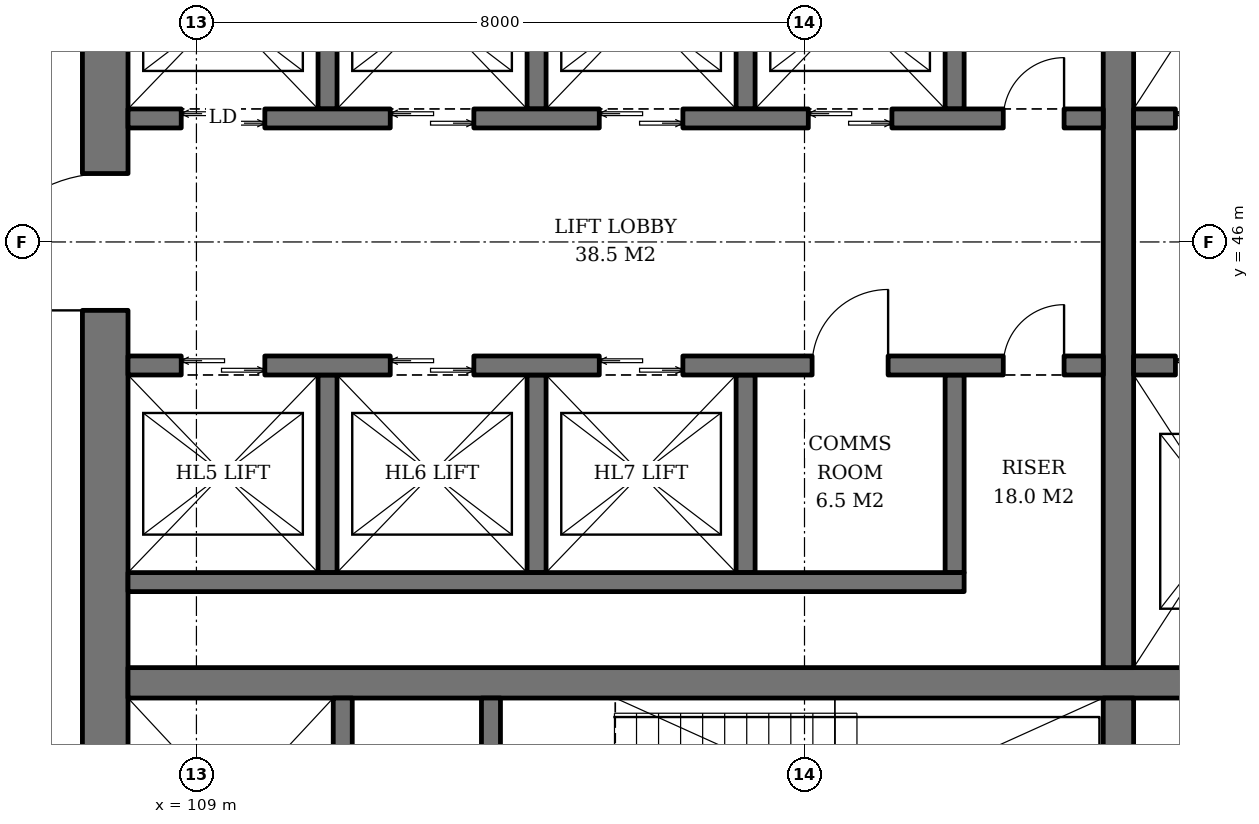
"""IFC4 building model, lengths in metres.
Left out: names, types, materials, properties, quantities, classifications, styles, units other than length and angle.
Written with IfcOpenShell. Run it as: python <this file> out.ifc"""

import sys

from ifc_helpers import new_model, si_unit, direction, frame, frame_2d, origin, place, context, subcontext, project, spatial, rectangle, extrude, element, fill, save


model = new_model("IFC4")
c1 = context("Model", 3, precision=1e-05, world=origin(), true_north=direction((0.0, 1.0)))
c2 = subcontext(c1, "Body", "Model", "MODEL_VIEW")
j1 = project(units=[si_unit("LENGTHUNIT", "METRE"), si_unit("PLANEANGLEUNIT", "RADIAN")], contexts=[c1])
p1 = place(None, origin())
s1 = spatial("IfcSite", under=j1, at=p1, CompositionType="ELEMENT")
p2 = place(p1, origin())
s2 = spatial("IfcBuilding", under=s1, at=p2, CompositionType="ELEMENT")
p3 = place(p2, frame((0.0, 0.0, 66.6)))
s3 = spatial("IfcBuildingStorey", under=s2, at=p3, CompositionType="ELEMENT", Elevation=66.6)
p4 = place(p3, frame((107.8, 37.1, 0.0), z_axis=(0.0, 0.0, 1.0), x_axis=(0.0, 1.0, 0.0)))
e1 = element("IfcWall", 1, at=p4, inside=s3, PredefinedType="SHEAR", context=c2, shape_type="SweptSolid", body=[
    extrude(rectangle(XDim=17.8, YDim=0.6, at=frame_2d((8.9, 0.0))), origin(), (0.0, 0.0, 1.0), 3.8),
])
p5 = place(p4, frame((8.0, 0.0, 0.0)))
e2 = element("IfcOpeningElement", 2, at=p5, cuts=e1, PredefinedType="OPENING", context=c2, shape_type="SweptSolid", body=[
    extrude(rectangle(XDim=1.8, YDim=2.4, at=frame_2d((0.9, 1.2))), frame((0.0, 0.31, 0.0), z_axis=(0.0, -1.0, 0.0), x_axis=(1.0, 0.0, 0.0)), (0.0, 0.0, 1.0), 0.62),
])
p6 = place(p3, frame((108.1, 40.2, 0.0), z_axis=(0.0, 0.0, 1.0), x_axis=(1.0, 0.0, 0.0)))
e3 = element("IfcWall", 3, at=p6, inside=s3, PredefinedType="SHEAR", context=c2, shape_type="SweptSolid", body=[
    extrude(rectangle(XDim=17.8, YDim=0.4, at=frame_2d((8.9, 0.0))), origin(), (0.0, 0.0, 1.0), 3.8),
])
p7 = place(p3, frame((121.13, 37.1, 0.0), z_axis=(0.0, 0.0, 1.0), x_axis=(0.0, 1.0, 0.0)))
e4 = element("IfcWall", 4, at=p7, inside=s3, PredefinedType="SHEAR", context=c2, shape_type="SweptSolid", body=[
    extrude(rectangle(XDim=2.9, YDim=0.4, at=frame_2d((1.45, 0.0))), origin(), (0.0, 0.0, 1.0), 3.8),
])
p8 = place(p3, frame((121.13, 40.4, 0.0), z_axis=(0.0, 0.0, 1.0), x_axis=(0.0, 1.0, 0.0)))
e5 = element("IfcWall", 5, at=p8, inside=s3, PredefinedType="SHEAR", context=c2, shape_type="SweptSolid", body=[
    extrude(rectangle(XDim=11.2, YDim=0.4, at=frame_2d((5.6, 0.0))), origin(), (0.0, 0.0, 1.0), 3.8),
])
p9 = place(p3, frame((110.925, 37.1, 0.0), z_axis=(0.0, 0.0, 1.0), x_axis=(0.0, 1.0, 0.0)))
e6 = element("IfcWall", 6, at=p9, inside=s3, PredefinedType="SHEAR", context=c2, shape_type="SweptSolid", body=[
    extrude(rectangle(XDim=2.9, YDim=0.25, at=frame_2d((1.45, 0.0))), origin(), (0.0, 0.0, 1.0), 3.8),
])
p10 = place(p9, frame((0.8, 0.0, 0.0)))
e7 = element("IfcOpeningElement", 7, at=p10, cuts=e6, PredefinedType="OPENING", context=c2, shape_type="SweptSolid", body=[
    extrude(rectangle(XDim=1.3, YDim=2.2, at=frame_2d((0.65, 1.1))), frame((0.0, 0.135, 0.0), z_axis=(0.0, -1.0, 0.0), x_axis=(1.0, 0.0, 0.0)), (0.0, 0.0, 1.0), 0.27),
])
p11 = place(p3, frame((112.875, 37.1, 0.0), z_axis=(0.0, 0.0, 1.0), x_axis=(0.0, 1.0, 0.0)))
e8 = element("IfcWall", 8, at=p11, inside=s3, PredefinedType="SHEAR", context=c2, shape_type="SweptSolid", body=[
    extrude(rectangle(XDim=2.9, YDim=0.25, at=frame_2d((1.45, 0.0))), origin(), (0.0, 0.0, 1.0), 3.8),
])
p12 = place(p11, frame((0.75, 0.0, 0.0)))
e9 = element("IfcOpeningElement", 9, at=p12, cuts=e8, PredefinedType="OPENING", context=c2, shape_type="SweptSolid", body=[
    extrude(rectangle(XDim=1.2, YDim=2.1, at=frame_2d((0.6, 1.05))), frame((0.0, 0.135, 0.0), z_axis=(0.0, -1.0, 0.0), x_axis=(1.0, 0.0, 0.0)), (0.0, 0.0, 1.0), 0.27),
])
for number, where, z_axis, x_axis in (
    (10, (110.725, 47.75, 0.0), (0.0, 0.0, 1.0), (0.0, 1.0, 0.0)),
    (11, (113.475, 47.75, 0.0), (0.0, 0.0, 1.0), (0.0, 1.0, 0.0)),
    (12, (116.225, 47.75, 0.0), (0.0, 0.0, 1.0), (0.0, 1.0, 0.0)),
    (13, (118.975, 47.75, 0.0), (0.0, 0.0, 1.0), (0.0, 1.0, 0.0)),
):
    element("IfcWall", number, at=place(p3, frame(where, z_axis=z_axis, x_axis=x_axis)), inside=s3, PredefinedType="SHEAR", context=c2, shape_type="SweptSolid", body=[
        extrude(rectangle(XDim=2.6, YDim=0.25, at=frame_2d((1.3, 0.0))), origin(), (0.0, 0.0, 1.0), 3.8),
    ])
p13 = place(p3, frame((108.1, 47.625, 0.0), z_axis=(0.0, 0.0, 1.0), x_axis=(1.0, 0.0, 0.0)))
e14 = element("IfcWall", 14, at=p13, inside=s3, PredefinedType="SHEAR", context=c2, shape_type="SweptSolid", body=[
    extrude(rectangle(XDim=12.83, YDim=0.25, at=frame_2d((6.415, 0.0))), origin(), (0.0, 0.0, 1.0), 3.8),
])
p14 = place(p13, frame((0.7, 0.0, 0.0)))
e15 = element("IfcOpeningElement", 15, at=p14, cuts=e14, PredefinedType="OPENING", context=c2, shape_type="SweptSolid", body=[
    extrude(rectangle(XDim=1.1, YDim=2.2, at=frame_2d((0.55, 1.1))), frame((0.0, 0.135, 0.0), z_axis=(0.0, -1.0, 0.0), x_axis=(1.0, 0.0, 0.0)), (0.0, 0.0, 1.0), 0.27),
])
p15 = place(p13, frame((3.45, 0.0, 0.0)))
e16 = element("IfcOpeningElement", 16, at=p15, cuts=e14, PredefinedType="OPENING", context=c2, shape_type="SweptSolid", body=[
    extrude(rectangle(XDim=1.1, YDim=2.2, at=frame_2d((0.55, 1.1))), frame((0.0, 0.135, 0.0), z_axis=(0.0, -1.0, 0.0), x_axis=(1.0, 0.0, 0.0)), (0.0, 0.0, 1.0), 0.27),
])
p16 = place(p13, frame((6.2, 0.0, 0.0)))
e17 = element("IfcOpeningElement", 17, at=p16, cuts=e14, PredefinedType="OPENING", context=c2, shape_type="SweptSolid", body=[
    extrude(rectangle(XDim=1.1, YDim=2.2, at=frame_2d((0.55, 1.1))), frame((0.0, 0.135, 0.0), z_axis=(0.0, -1.0, 0.0), x_axis=(1.0, 0.0, 0.0)), (0.0, 0.0, 1.0), 0.27),
])
p17 = place(p13, frame((8.95, 0.0, 0.0)))
e18 = element("IfcOpeningElement", 18, at=p17, cuts=e14, PredefinedType="OPENING", context=c2, shape_type="SweptSolid", body=[
    extrude(rectangle(XDim=1.1, YDim=2.2, at=frame_2d((0.55, 1.1))), frame((0.0, 0.135, 0.0), z_axis=(0.0, -1.0, 0.0), x_axis=(1.0, 0.0, 0.0)), (0.0, 0.0, 1.0), 0.27),
])
p18 = place(p13, frame((11.515, 0.0, 0.0)))
e19 = element("IfcOpeningElement", 19, at=p18, cuts=e14, PredefinedType="OPENING", context=c2, shape_type="SweptSolid", body=[
    extrude(rectangle(XDim=0.8, YDim=2.0, at=frame_2d((0.4, 1.0))), frame((0.0, 0.135, 0.0), z_axis=(0.0, -1.0, 0.0), x_axis=(1.0, 0.0, 0.0)), (0.0, 0.0, 1.0), 0.27),
])
for number, where, z_axis, x_axis in (
    (20, (110.725, 44.25, 0.0), (0.0, 0.0, 1.0), (0.0, -1.0, 0.0)),
    (21, (113.475, 44.25, 0.0), (0.0, 0.0, 1.0), (0.0, -1.0, 0.0)),
    (22, (116.225, 44.25, 0.0), (0.0, 0.0, 1.0), (0.0, -1.0, 0.0)),
    (23, (118.975, 44.25, 0.0), (0.0, 0.0, 1.0), (0.0, -1.0, 0.0)),
):
    element("IfcWall", number, at=place(p3, frame(where, z_axis=z_axis, x_axis=x_axis)), inside=s3, PredefinedType="SHEAR", context=c2, shape_type="SweptSolid", body=[
        extrude(rectangle(XDim=2.6, YDim=0.25, at=frame_2d((1.3, 0.0))), origin(), (0.0, 0.0, 1.0), 3.8),
    ])
p19 = place(p3, frame((108.1, 41.525, 0.0), z_axis=(0.0, 0.0, 1.0), x_axis=(1.0, 0.0, 0.0)))
e24 = element("IfcWall", 24, at=p19, inside=s3, PredefinedType="SHEAR", context=c2, shape_type="SweptSolid", body=[
    extrude(rectangle(XDim=11.0, YDim=0.25, at=frame_2d((5.5, 0.0))), origin(), (0.0, 0.0, 1.0), 3.8),
])
p20 = place(p3, frame((108.1, 44.375, 0.0), z_axis=(0.0, 0.0, 1.0), x_axis=(1.0, 0.0, 0.0)))
e25 = element("IfcWall", 25, at=p20, inside=s3, PredefinedType="SHEAR", context=c2, shape_type="SweptSolid", body=[
    extrude(rectangle(XDim=12.83, YDim=0.25, at=frame_2d((6.415, 0.0))), origin(), (0.0, 0.0, 1.0), 3.8),
])
p21 = place(p20, frame((0.7, 0.0, 0.0)))
e26 = element("IfcOpeningElement", 26, at=p21, cuts=e25, PredefinedType="OPENING", context=c2, shape_type="SweptSolid", body=[
    extrude(rectangle(XDim=1.1, YDim=2.2, at=frame_2d((0.55, 1.1))), frame((0.0, 0.135, 0.0), z_axis=(0.0, -1.0, 0.0), x_axis=(1.0, 0.0, 0.0)), (0.0, 0.0, 1.0), 0.27),
])
p22 = place(p20, frame((3.45, 0.0, 0.0)))
e27 = element("IfcOpeningElement", 27, at=p22, cuts=e25, PredefinedType="OPENING", context=c2, shape_type="SweptSolid", body=[
    extrude(rectangle(XDim=1.1, YDim=2.2, at=frame_2d((0.55, 1.1))), frame((0.0, 0.135, 0.0), z_axis=(0.0, -1.0, 0.0), x_axis=(1.0, 0.0, 0.0)), (0.0, 0.0, 1.0), 0.27),
])
p23 = place(p20, frame((6.2, 0.0, 0.0)))
e28 = element("IfcOpeningElement", 28, at=p23, cuts=e25, PredefinedType="OPENING", context=c2, shape_type="SweptSolid", body=[
    extrude(rectangle(XDim=1.1, YDim=2.2, at=frame_2d((0.55, 1.1))), frame((0.0, 0.135, 0.0), z_axis=(0.0, -1.0, 0.0), x_axis=(1.0, 0.0, 0.0)), (0.0, 0.0, 1.0), 0.27),
])
p24 = place(p20, frame((9.0, 0.0, 0.0)))
e29 = element("IfcOpeningElement", 29, at=p24, cuts=e25, PredefinedType="OPENING", context=c2, shape_type="SweptSolid", body=[
    extrude(rectangle(XDim=1.0, YDim=2.1, at=frame_2d((0.5, 1.05))), frame((0.0, 0.135, 0.0), z_axis=(0.0, -1.0, 0.0), x_axis=(1.0, 0.0, 0.0)), (0.0, 0.0, 1.0), 0.27),
])
p25 = place(p20, frame((11.515, 0.0, 0.0)))
e30 = element("IfcOpeningElement", 30, at=p25, cuts=e25, PredefinedType="OPENING", context=c2, shape_type="SweptSolid", body=[
    extrude(rectangle(XDim=0.8, YDim=2.0, at=frame_2d((0.4, 1.0))), frame((0.0, 0.135, 0.0), z_axis=(0.0, -1.0, 0.0), x_axis=(1.0, 0.0, 0.0)), (0.0, 0.0, 1.0), 0.27),
])
p26 = place(p3, frame((121.33, 47.625, 0.0), z_axis=(0.0, 0.0, 1.0), x_axis=(1.0, 0.0, 0.0)))
e31 = element("IfcWall", 31, at=p26, inside=s3, PredefinedType="SHEAR", context=c2, shape_type="SweptSolid", body=[
    extrude(rectangle(XDim=4.57, YDim=0.25, at=frame_2d((2.285, 0.0))), origin(), (0.0, 0.0, 1.0), 3.8),
])
p27 = place(p26, frame((0.55, 0.0, 0.0)))
e32 = element("IfcOpeningElement", 32, at=p27, cuts=e31, PredefinedType="OPENING", context=c2, shape_type="SweptSolid", body=[
    extrude(rectangle(XDim=1.4, YDim=2.4, at=frame_2d((0.7, 1.2))), frame((0.0, 0.135, 0.0), z_axis=(0.0, -1.0, 0.0), x_axis=(1.0, 0.0, 0.0)), (0.0, 0.0, 1.0), 0.27),
])
p28 = place(p26, frame((3.26, 0.0, 0.0)))
e33 = element("IfcOpeningElement", 33, at=p28, cuts=e31, PredefinedType="OPENING", context=c2, shape_type="SweptSolid", body=[
    extrude(rectangle(XDim=0.8, YDim=2.0, at=frame_2d((0.4, 1.0))), frame((0.0, 0.135, 0.0), z_axis=(0.0, -1.0, 0.0), x_axis=(1.0, 0.0, 0.0)), (0.0, 0.0, 1.0), 0.27),
])
p29 = place(p3, frame((121.33, 44.375, 0.0), z_axis=(0.0, 0.0, 1.0), x_axis=(1.0, 0.0, 0.0)))
e34 = element("IfcWall", 34, at=p29, inside=s3, PredefinedType="SHEAR", context=c2, shape_type="SweptSolid", body=[
    extrude(rectangle(XDim=4.57, YDim=0.25, at=frame_2d((2.285, 0.0))), origin(), (0.0, 0.0, 1.0), 3.8),
])
p30 = place(p29, frame((0.55, 0.0, 0.0)))
e35 = element("IfcOpeningElement", 35, at=p30, cuts=e34, PredefinedType="OPENING", context=c2, shape_type="SweptSolid", body=[
    extrude(rectangle(XDim=1.4, YDim=2.4, at=frame_2d((0.7, 1.2))), frame((0.0, 0.135, 0.0), z_axis=(0.0, -1.0, 0.0), x_axis=(1.0, 0.0, 0.0)), (0.0, 0.0, 1.0), 0.27),
])
p31 = place(p29, frame((3.26, 0.0, 0.0)))
e36 = element("IfcOpeningElement", 36, at=p31, cuts=e34, PredefinedType="OPENING", context=c2, shape_type="SweptSolid", body=[
    extrude(rectangle(XDim=0.8, YDim=2.0, at=frame_2d((0.4, 1.0))), frame((0.0, 0.135, 0.0), z_axis=(0.0, -1.0, 0.0), x_axis=(1.0, 0.0, 0.0)), (0.0, 0.0, 1.0), 0.27),
])
p32 = place(p14, origin())
e37 = element("IfcDoor", 37, at=p32, inside=s3, OperationType="DOUBLE_DOOR_SLIDING", PredefinedType="DOOR", context=c2, shape_type="SweptSolid", body=[
    extrude(rectangle(XDim=1.1, YDim=2.2, at=frame_2d((0.55, 1.1))), frame((0.0, 0.025, 0.0), z_axis=(0.0, -1.0, 0.0), x_axis=(1.0, 0.0, 0.0)), (0.0, 0.0, 1.0), 0.05),
])
fill(e15, e37)
p33 = place(p15, origin())
e38 = element("IfcDoor", 38, at=p33, inside=s3, OperationType="DOUBLE_DOOR_SLIDING", PredefinedType="DOOR", context=c2, shape_type="SweptSolid", body=[
    extrude(rectangle(XDim=1.1, YDim=2.2, at=frame_2d((0.55, 1.1))), frame((0.0, 0.025, 0.0), z_axis=(0.0, -1.0, 0.0), x_axis=(1.0, 0.0, 0.0)), (0.0, 0.0, 1.0), 0.05),
])
fill(e16, e38)
p34 = place(p16, origin())
e39 = element("IfcDoor", 39, at=p34, inside=s3, OperationType="DOUBLE_DOOR_SLIDING", PredefinedType="DOOR", context=c2, shape_type="SweptSolid", body=[
    extrude(rectangle(XDim=1.1, YDim=2.2, at=frame_2d((0.55, 1.1))), frame((0.0, 0.025, 0.0), z_axis=(0.0, -1.0, 0.0), x_axis=(1.0, 0.0, 0.0)), (0.0, 0.0, 1.0), 0.05),
])
fill(e17, e39)
p35 = place(p17, origin())
e40 = element("IfcDoor", 40, at=p35, inside=s3, OperationType="DOUBLE_DOOR_SLIDING", PredefinedType="DOOR", context=c2, shape_type="SweptSolid", body=[
    extrude(rectangle(XDim=1.1, YDim=2.2, at=frame_2d((0.55, 1.1))), frame((0.0, 0.025, 0.0), z_axis=(0.0, -1.0, 0.0), x_axis=(1.0, 0.0, 0.0)), (0.0, 0.0, 1.0), 0.05),
])
fill(e18, e40)
p36 = place(p18, origin())
e41 = element("IfcDoor", 41, at=p36, inside=s3, OperationType="SINGLE_SWING_RIGHT", PredefinedType="DOOR", context=c2, shape_type="SweptSolid", body=[
    extrude(rectangle(XDim=0.8, YDim=2.0, at=frame_2d((0.4, 1.0))), frame((0.0, 0.025, 0.0), z_axis=(0.0, -1.0, 0.0), x_axis=(1.0, 0.0, 0.0)), (0.0, 0.0, 1.0), 0.05),
])
fill(e19, e41)
p37 = place(p21, origin())
e42 = element("IfcDoor", 42, at=p37, inside=s3, OperationType="DOUBLE_DOOR_SLIDING", PredefinedType="DOOR", context=c2, shape_type="SweptSolid", body=[
    extrude(rectangle(XDim=1.1, YDim=2.2, at=frame_2d((0.55, 1.1))), frame((0.0, 0.025, 0.0), z_axis=(0.0, -1.0, 0.0), x_axis=(1.0, 0.0, 0.0)), (0.0, 0.0, 1.0), 0.05),
])
fill(e26, e42)
p38 = place(p22, origin())
e43 = element("IfcDoor", 43, at=p38, inside=s3, OperationType="DOUBLE_DOOR_SLIDING", PredefinedType="DOOR", context=c2, shape_type="SweptSolid", body=[
    extrude(rectangle(XDim=1.1, YDim=2.2, at=frame_2d((0.55, 1.1))), frame((0.0, 0.025, 0.0), z_axis=(0.0, -1.0, 0.0), x_axis=(1.0, 0.0, 0.0)), (0.0, 0.0, 1.0), 0.05),
])
fill(e27, e43)
p39 = place(p23, origin())
e44 = element("IfcDoor", 44, at=p39, inside=s3, OperationType="DOUBLE_DOOR_SLIDING", PredefinedType="DOOR", context=c2, shape_type="SweptSolid", body=[
    extrude(rectangle(XDim=1.1, YDim=2.2, at=frame_2d((0.55, 1.1))), frame((0.0, 0.025, 0.0), z_axis=(0.0, -1.0, 0.0), x_axis=(1.0, 0.0, 0.0)), (0.0, 0.0, 1.0), 0.05),
])
fill(e28, e44)
p40 = place(p24, origin())
e45 = element("IfcDoor", 45, at=p40, inside=s3, OperationType="SINGLE_SWING_RIGHT", PredefinedType="DOOR", context=c2, shape_type="SweptSolid", body=[
    extrude(rectangle(XDim=1.0, YDim=2.1, at=frame_2d((0.5, 1.05))), frame((0.0, 0.025, 0.0), z_axis=(0.0, -1.0, 0.0), x_axis=(1.0, 0.0, 0.0)), (0.0, 0.0, 1.0), 0.05),
])
fill(e29, e45)
p41 = place(p25, origin())
e46 = element("IfcDoor", 46, at=p41, inside=s3, OperationType="SINGLE_SWING_RIGHT", PredefinedType="DOOR", context=c2, shape_type="SweptSolid", body=[
    extrude(rectangle(XDim=0.8, YDim=2.0, at=frame_2d((0.4, 1.0))), frame((0.0, 0.025, 0.0), z_axis=(0.0, -1.0, 0.0), x_axis=(1.0, 0.0, 0.0)), (0.0, 0.0, 1.0), 0.05),
])
fill(e30, e46)
p42 = place(p27, origin())
e47 = element("IfcDoor", 47, at=p42, inside=s3, OperationType="DOUBLE_DOOR_SLIDING", PredefinedType="DOOR", context=c2, shape_type="SweptSolid", body=[
    extrude(rectangle(XDim=1.4, YDim=2.4, at=frame_2d((0.7, 1.2))), frame((0.0, 0.025, 0.0), z_axis=(0.0, -1.0, 0.0), x_axis=(1.0, 0.0, 0.0)), (0.0, 0.0, 1.0), 0.05),
])
fill(e32, e47)
p43 = place(p30, origin())
e48 = element("IfcDoor", 48, at=p43, inside=s3, OperationType="DOUBLE_DOOR_SLIDING", PredefinedType="DOOR", context=c2, shape_type="SweptSolid", body=[
    extrude(rectangle(XDim=1.4, YDim=2.4, at=frame_2d((0.7, 1.2))), frame((0.0, 0.025, 0.0), z_axis=(0.0, -1.0, 0.0), x_axis=(1.0, 0.0, 0.0)), (0.0, 0.0, 1.0), 0.05),
])
fill(e35, e48)
p44 = place(p5, origin())
e49 = element("IfcDoor", 49, at=p44, inside=s3, OperationType="DOUBLE_DOOR_SINGLE_SWING", PredefinedType="DOOR", context=c2, shape_type="SweptSolid", body=[
    extrude(rectangle(XDim=1.8, YDim=2.4, at=frame_2d((0.9, 1.2))), frame((0.0, 0.025, 0.0), z_axis=(0.0, -1.0, 0.0), x_axis=(1.0, 0.0, 0.0)), (0.0, 0.0, 1.0), 0.05),
])
fill(e2, e49)
save(model, sys.argv[1])
